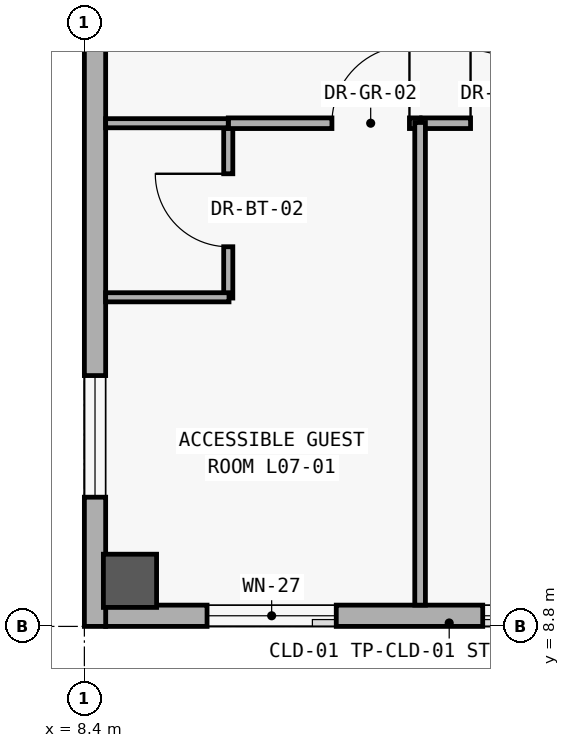
"""IFC4 building model, lengths in metres.
Left out: names, types, materials, properties, quantities, classifications, styles, units other than length and angle.
Written with IfcOpenShell. Run it as: python <this file> out.ifc"""

import sys

from ifc_helpers import new_model, si_unit, direction, frame, frame_2d, origin, origin_2d, place, context, subcontext, project, spatial, rectangle, extrude, element, fill, save


model = new_model("IFC4")
c1 = context("Model", 3, precision=1e-05, world=origin(), true_north=direction((0.0, 1.0)))
c2 = subcontext(c1, "Body", "Model", "MODEL_VIEW")
j1 = project(units=[si_unit("LENGTHUNIT", "METRE"), si_unit("PLANEANGLEUNIT", "RADIAN")], contexts=[c1])
p1 = place(None, origin())
s1 = spatial("IfcSite", under=j1, at=p1, CompositionType="ELEMENT")
p2 = place(p1, origin())
s2 = spatial("IfcBuilding", under=s1, at=p2, CompositionType="ELEMENT")
p3 = place(p2, frame((0.0, 0.0, 30.0)))
s3 = spatial("IfcBuildingStorey", under=s2, at=p3, CompositionType="ELEMENT", Elevation=30.0)
p4 = place(p3, frame((9.0, 9.4, 0.0), z_axis=(0.0, 0.0, 1.0), x_axis=(1.0, 0.0, 0.0)))
e1 = element("IfcColumn", 1, at=p4, inside=s3, PredefinedType="COLUMN", context=c2, shape_type="SweptSolid", body=[
    extrude(rectangle(XDim=0.7, YDim=0.7, at=origin_2d()), origin(), (0.0, 0.0, 1.0), 3.6),
])
p5 = place(p3, frame((75.32, 8.94, 0.0), z_axis=(0.0, 0.0, 1.0), x_axis=(-1.0, 0.0, 0.0)))
e2 = element("IfcWall", 2, at=p5, inside=s3, PredefinedType="SOLIDWALL", context=c2, shape_type="SweptSolid", body=[
    extrude(rectangle(XDim=66.64, YDim=0.28, at=frame_2d((33.32, 0.0))), origin(), (0.0, 0.0, 1.0), 3.34),
])
p6 = place(p5, frame((6.47, 0.0, 0.85)))
e3 = element("IfcOpeningElement", 3, at=p6, cuts=e2, PredefinedType="OPENING", context=c2, shape_type="SweptSolid", body=[
    extrude(rectangle(XDim=2.4, YDim=1.8, at=frame_2d((1.2, 0.9))), frame((0.0, 0.15, 0.0), z_axis=(0.0, -1.0, 0.0), x_axis=(1.0, 0.0, 0.0)), (0.0, 0.0, 1.0), 0.3),
])
p7 = place(p5, frame((63.606, 0.0, 0.85)))
e4 = element("IfcOpeningElement", 4, at=p7, cuts=e2, PredefinedType="OPENING", context=c2, shape_type="SweptSolid", body=[
    extrude(rectangle(XDim=1.7, YDim=2.0, at=frame_2d((0.85, 1.0))), frame((0.0, 0.15, 0.0), z_axis=(0.0, -1.0, 0.0), x_axis=(1.0, 0.0, 0.0)), (0.0, 0.0, 1.0), 0.3),
])
p8 = place(p5, frame((59.379, 0.0, 0.85)))
e5 = element("IfcOpeningElement", 5, at=p8, cuts=e2, PredefinedType="OPENING", context=c2, shape_type="SweptSolid", body=[
    extrude(rectangle(XDim=2.3, YDim=2.05, at=frame_2d((1.15, 1.025))), frame((0.0, 0.15, 0.0), z_axis=(0.0, -1.0, 0.0), x_axis=(1.0, 0.0, 0.0)), (0.0, 0.0, 1.0), 0.3),
])
p9 = place(p5, frame((55.227, 0.0, 0.85)))
e6 = element("IfcOpeningElement", 6, at=p9, cuts=e2, PredefinedType="OPENING", context=c2, shape_type="SweptSolid", body=[
    extrude(rectangle(XDim=2.75, YDim=2.1, at=frame_2d((1.375, 1.05))), frame((0.0, 0.15, 0.0), z_axis=(0.0, -1.0, 0.0), x_axis=(1.0, 0.0, 0.0)), (0.0, 0.0, 1.0), 0.3),
])
p10 = place(p5, frame((52.085, 0.0, 0.85)))
e7 = element("IfcOpeningElement", 7, at=p10, cuts=e2, PredefinedType="OPENING", context=c2, shape_type="SweptSolid", body=[
    extrude(rectangle(XDim=1.18, YDim=1.5, at=frame_2d((0.59, 0.75))), frame((0.0, 0.15, 0.0), z_axis=(0.0, -1.0, 0.0), x_axis=(1.0, 0.0, 0.0)), (0.0, 0.0, 1.0), 0.3),
])
p11 = place(p5, frame((48.108, 0.0, 0.85)))
e8 = element("IfcOpeningElement", 8, at=p11, cuts=e2, PredefinedType="OPENING", context=c2, shape_type="SweptSolid", body=[
    extrude(rectangle(XDim=1.28, YDim=1.6, at=frame_2d((0.64, 0.8))), frame((0.0, 0.15, 0.0), z_axis=(0.0, -1.0, 0.0), x_axis=(1.0, 0.0, 0.0)), (0.0, 0.0, 1.0), 0.3),
])
p12 = place(p5, frame((44.131, 0.0, 0.85)))
e9 = element("IfcOpeningElement", 9, at=p12, cuts=e2, PredefinedType="OPENING", context=c2, shape_type="SweptSolid", body=[
    extrude(rectangle(XDim=1.38, YDim=1.7, at=frame_2d((0.69, 0.85))), frame((0.0, 0.15, 0.0), z_axis=(0.0, -1.0, 0.0), x_axis=(1.0, 0.0, 0.0)), (0.0, 0.0, 1.0), 0.3),
])
p13 = place(p5, frame((40.155, 0.0, 0.85)))
e10 = element("IfcOpeningElement", 10, at=p13, cuts=e2, PredefinedType="OPENING", context=c2, shape_type="SweptSolid", body=[
    extrude(rectangle(XDim=1.48, YDim=1.8, at=frame_2d((0.74, 0.9))), frame((0.0, 0.15, 0.0), z_axis=(0.0, -1.0, 0.0), x_axis=(1.0, 0.0, 0.0)), (0.0, 0.0, 1.0), 0.3),
])
p14 = place(p5, frame((36.178, 0.0, 0.85)))
e11 = element("IfcOpeningElement", 11, at=p14, cuts=e2, PredefinedType="OPENING", context=c2, shape_type="SweptSolid", body=[
    extrude(rectangle(XDim=1.58, YDim=1.85, at=frame_2d((0.79, 0.925))), frame((0.0, 0.15, 0.0), z_axis=(0.0, -1.0, 0.0), x_axis=(1.0, 0.0, 0.0)), (0.0, 0.0, 1.0), 0.3),
])
p15 = place(p5, frame((32.201, 0.0, 0.85)))
e12 = element("IfcOpeningElement", 12, at=p15, cuts=e2, PredefinedType="OPENING", context=c2, shape_type="SweptSolid", body=[
    extrude(rectangle(XDim=1.68, YDim=1.9, at=frame_2d((0.84, 0.95))), frame((0.0, 0.15, 0.0), z_axis=(0.0, -1.0, 0.0), x_axis=(1.0, 0.0, 0.0)), (0.0, 0.0, 1.0), 0.3),
])
p16 = place(p5, frame((28.224, 0.0, 0.85)))
e13 = element("IfcOpeningElement", 13, at=p16, cuts=e2, PredefinedType="OPENING", context=c2, shape_type="SweptSolid", body=[
    extrude(rectangle(XDim=1.78, YDim=1.95, at=frame_2d((0.89, 0.975))), frame((0.0, 0.15, 0.0), z_axis=(0.0, -1.0, 0.0), x_axis=(1.0, 0.0, 0.0)), (0.0, 0.0, 1.0), 0.3),
])
p17 = place(p5, frame((24.247, 0.0, 0.85)))
e14 = element("IfcOpeningElement", 14, at=p17, cuts=e2, PredefinedType="OPENING", context=c2, shape_type="SweptSolid", body=[
    extrude(rectangle(XDim=1.88, YDim=1.95, at=frame_2d((0.94, 0.975))), frame((0.0, 0.15, 0.0), z_axis=(0.0, -1.0, 0.0), x_axis=(1.0, 0.0, 0.0)), (0.0, 0.0, 1.0), 0.3),
])
p18 = place(p5, frame((20.235, 0.0, 0.85)))
e15 = element("IfcOpeningElement", 15, at=p18, cuts=e2, PredefinedType="OPENING", context=c2, shape_type="SweptSolid", body=[
    extrude(rectangle(XDim=2.05, YDim=1.95, at=frame_2d((1.025, 0.975))), frame((0.0, 0.15, 0.0), z_axis=(0.0, -1.0, 0.0), x_axis=(1.0, 0.0, 0.0)), (0.0, 0.0, 1.0), 0.3),
])
p19 = place(p5, frame((16.243, 0.0, 0.85)))
e16 = element("IfcOpeningElement", 16, at=p19, cuts=e2, PredefinedType="OPENING", context=c2, shape_type="SweptSolid", body=[
    extrude(rectangle(XDim=2.18, YDim=1.95, at=frame_2d((1.09, 0.975))), frame((0.0, 0.15, 0.0), z_axis=(0.0, -1.0, 0.0), x_axis=(1.0, 0.0, 0.0)), (0.0, 0.0, 1.0), 0.3),
])
p20 = place(p3, frame((8.54, 8.8, 0.0), z_axis=(0.0, 0.0, 1.0), x_axis=(0.0, 1.0, 0.0)))
e17 = element("IfcWall", 17, at=p20, inside=s3, PredefinedType="SOLIDWALL", context=c2, shape_type="SweptSolid", body=[
    extrude(rectangle(XDim=25.2, YDim=0.28, at=frame_2d((12.6, 0.0))), origin(), (0.0, 0.0, 1.0), 3.34),
])
p21 = place(p20, frame((1.7, 0.0, 0.95)))
e18 = element("IfcOpeningElement", 18, at=p21, cuts=e17, PredefinedType="OPENING", context=c2, shape_type="SweptSolid", body=[
    extrude(rectangle(XDim=1.6, YDim=1.6, at=frame_2d((0.8, 0.8))), frame((0.0, 0.15, 0.0), z_axis=(0.0, -1.0, 0.0), x_axis=(1.0, 0.0, 0.0)), (0.0, 0.0, 1.0), 0.3),
])
p22 = place(p3, frame((10.293, 13.12, 0.0), z_axis=(0.0, 0.0, 1.0), x_axis=(0.0, 1.0, 0.0)))
e19 = element("IfcWall", 19, at=p22, inside=s3, PredefinedType="PARTITIONING", context=c2, shape_type="SweptSolid", body=[
    extrude(rectangle(XDim=2.31, YDim=0.12, at=frame_2d((1.155, 0.0))), origin(), (0.0, 0.0, 1.0), 2.48),
])
p23 = place(p22, frame((0.675, 0.0, 0.0)))
e20 = element("IfcOpeningElement", 20, at=p23, cuts=e19, PredefinedType="OPENING", context=c2, shape_type="SweptSolid", body=[
    extrude(rectangle(XDim=0.96, YDim=2.15, at=frame_2d((0.48, 1.075))), frame((0.0, 0.07, 0.0), z_axis=(0.0, -1.0, 0.0), x_axis=(1.0, 0.0, 0.0)), (0.0, 0.0, 1.0), 0.14),
])
p24 = place(p3, frame((10.293, 15.42, 0.0), z_axis=(0.0, 0.0, 1.0), x_axis=(1.0, 0.0, 0.0)))
e21 = element("IfcWall", 21, at=p24, inside=s3, PredefinedType="PARTITIONING", context=c2, shape_type="SweptSolid", body=[
    extrude(rectangle(XDim=2.524, YDim=0.14, at=frame_2d((1.262, 0.0))), origin(), (0.0, 0.0, 1.0), 2.48),
])
p25 = place(p24, frame((1.364, 0.0, 0.0)))
e22 = element("IfcOpeningElement", 22, at=p25, cuts=e21, PredefinedType="OPENING", context=c2, shape_type="SweptSolid", body=[
    extrude(rectangle(XDim=1.02, YDim=2.2, at=frame_2d((0.51, 1.1))), frame((0.0, 0.08, 0.0), z_axis=(0.0, -1.0, 0.0), x_axis=(1.0, 0.0, 0.0)), (0.0, 0.0, 1.0), 0.16),
])
p26 = place(p3, frame((12.837, 15.42, 0.0), z_axis=(0.0, 0.0, 1.0), x_axis=(1.0, 0.0, 0.0)))
e23 = element("IfcWall", 23, at=p26, inside=s3, PredefinedType="PARTITIONING", context=c2, shape_type="SweptSolid", body=[
    extrude(rectangle(XDim=2.524, YDim=0.14, at=frame_2d((1.262, 0.0))), origin(), (0.0, 0.0, 1.0), 2.48),
])
p27 = place(p26, frame((0.644, 0.0, 0.0)))
e24 = element("IfcOpeningElement", 24, at=p27, cuts=e23, PredefinedType="OPENING", context=c2, shape_type="SweptSolid", body=[
    extrude(rectangle(XDim=0.96, YDim=2.25, at=frame_2d((0.48, 1.125))), frame((0.0, 0.08, 0.0), z_axis=(0.0, -1.0, 0.0), x_axis=(1.0, 0.0, 0.0)), (0.0, 0.0, 1.0), 0.16),
])
p28 = place(p3, frame((8.68, 13.13, 0.0), z_axis=(0.0, 0.0, 1.0), x_axis=(1.0, 0.0, 0.0)))
e25 = element("IfcWall", 25, at=p28, inside=s3, PredefinedType="PARTITIONING", context=c2, shape_type="SweptSolid", body=[
    extrude(rectangle(XDim=1.623, YDim=0.12, at=frame_2d((0.812, 0.0))), origin(), (0.0, 0.0, 1.0), 2.48),
])
p29 = place(p3, frame((8.68, 15.42, 0.0), z_axis=(0.0, 0.0, 1.0), x_axis=(1.0, 0.0, 0.0)))
e26 = element("IfcWall", 26, at=p29, inside=s3, PredefinedType="PARTITIONING", context=c2, shape_type="SweptSolid", body=[
    extrude(rectangle(XDim=1.613, YDim=0.12, at=frame_2d((0.807, 0.0))), origin(), (0.0, 0.0, 1.0), 2.48),
])
p30 = place(p3, frame((12.817, 9.08, 0.0), z_axis=(0.0, 0.0, 1.0), x_axis=(0.0, 1.0, 0.0)))
e27 = element("IfcWall", 27, at=p30, inside=s3, PredefinedType="PARTITIONING", context=c2, shape_type="SweptSolid", body=[
    extrude(rectangle(XDim=6.35, YDim=0.14, at=frame_2d((3.175, 0.0))), origin(), (0.0, 0.0, 1.0), 2.48),
])
p31 = place(p7, origin())
e28 = element("IfcWindow", 28, at=p31, inside=s3, PartitioningType="SINGLE_PANEL", PredefinedType="WINDOW", context=c2, shape_type="SweptSolid", body=[
    extrude(rectangle(XDim=1.7, YDim=2.0, at=frame_2d((0.85, 1.0))), frame((0.0, 0.03, 0.0), z_axis=(0.0, -1.0, 0.0), x_axis=(1.0, 0.0, 0.0)), (0.0, 0.0, 1.0), 0.06),
])
fill(e4, e28)
p32 = place(p8, origin())
e29 = element("IfcWindow", 29, at=p32, inside=s3, PartitioningType="SINGLE_PANEL", PredefinedType="WINDOW", context=c2, shape_type="SweptSolid", body=[
    extrude(rectangle(XDim=2.3, YDim=2.05, at=frame_2d((1.15, 1.025))), frame((0.0, 0.03, 0.0), z_axis=(0.0, -1.0, 0.0), x_axis=(1.0, 0.0, 0.0)), (0.0, 0.0, 1.0), 0.06),
])
fill(e5, e29)
p33 = place(p21, origin())
e30 = element("IfcWindow", 30, at=p33, inside=s3, PartitioningType="SINGLE_PANEL", PredefinedType="WINDOW", context=c2, shape_type="SweptSolid", body=[
    extrude(rectangle(XDim=1.6, YDim=1.6, at=frame_2d((0.8, 0.8))), frame((0.0, 0.03, 0.0), z_axis=(0.0, -1.0, 0.0), x_axis=(1.0, 0.0, 0.0)), (0.0, 0.0, 1.0), 0.06),
])
fill(e18, e30)
p34 = place(p23, origin())
e31 = element("IfcDoor", 31, at=p34, inside=s3, OperationType="SINGLE_SWING_RIGHT", PredefinedType="DOOR", context=c2, shape_type="SweptSolid", body=[
    extrude(rectangle(XDim=0.96, YDim=2.15, at=frame_2d((0.48, 1.075))), frame((0.0, 0.025, 0.0), z_axis=(0.0, -1.0, 0.0), x_axis=(1.0, 0.0, 0.0)), (0.0, 0.0, 1.0), 0.05),
])
fill(e20, e31)
p35 = place(p25, origin())
e32 = element("IfcDoor", 32, at=p35, inside=s3, OperationType="SINGLE_SWING_RIGHT", PredefinedType="DOOR", context=c2, shape_type="SweptSolid", body=[
    extrude(rectangle(XDim=1.02, YDim=2.2, at=frame_2d((0.51, 1.1))), frame((0.0, 0.025, 0.0), z_axis=(0.0, -1.0, 0.0), x_axis=(1.0, 0.0, 0.0)), (0.0, 0.0, 1.0), 0.05),
])
fill(e22, e32)
p36 = place(p27, origin())
e33 = element("IfcDoor", 33, at=p36, inside=s3, OperationType="SINGLE_SWING_LEFT", PredefinedType="DOOR", context=c2, shape_type="SweptSolid", body=[
    extrude(rectangle(XDim=0.96, YDim=2.25, at=frame_2d((0.48, 1.125))), frame((0.0, 0.025, 0.0), z_axis=(0.0, -1.0, 0.0), x_axis=(1.0, 0.0, 0.0)), (0.0, 0.0, 1.0), 0.05),
])
fill(e24, e33)
save(model, sys.argv[1])
